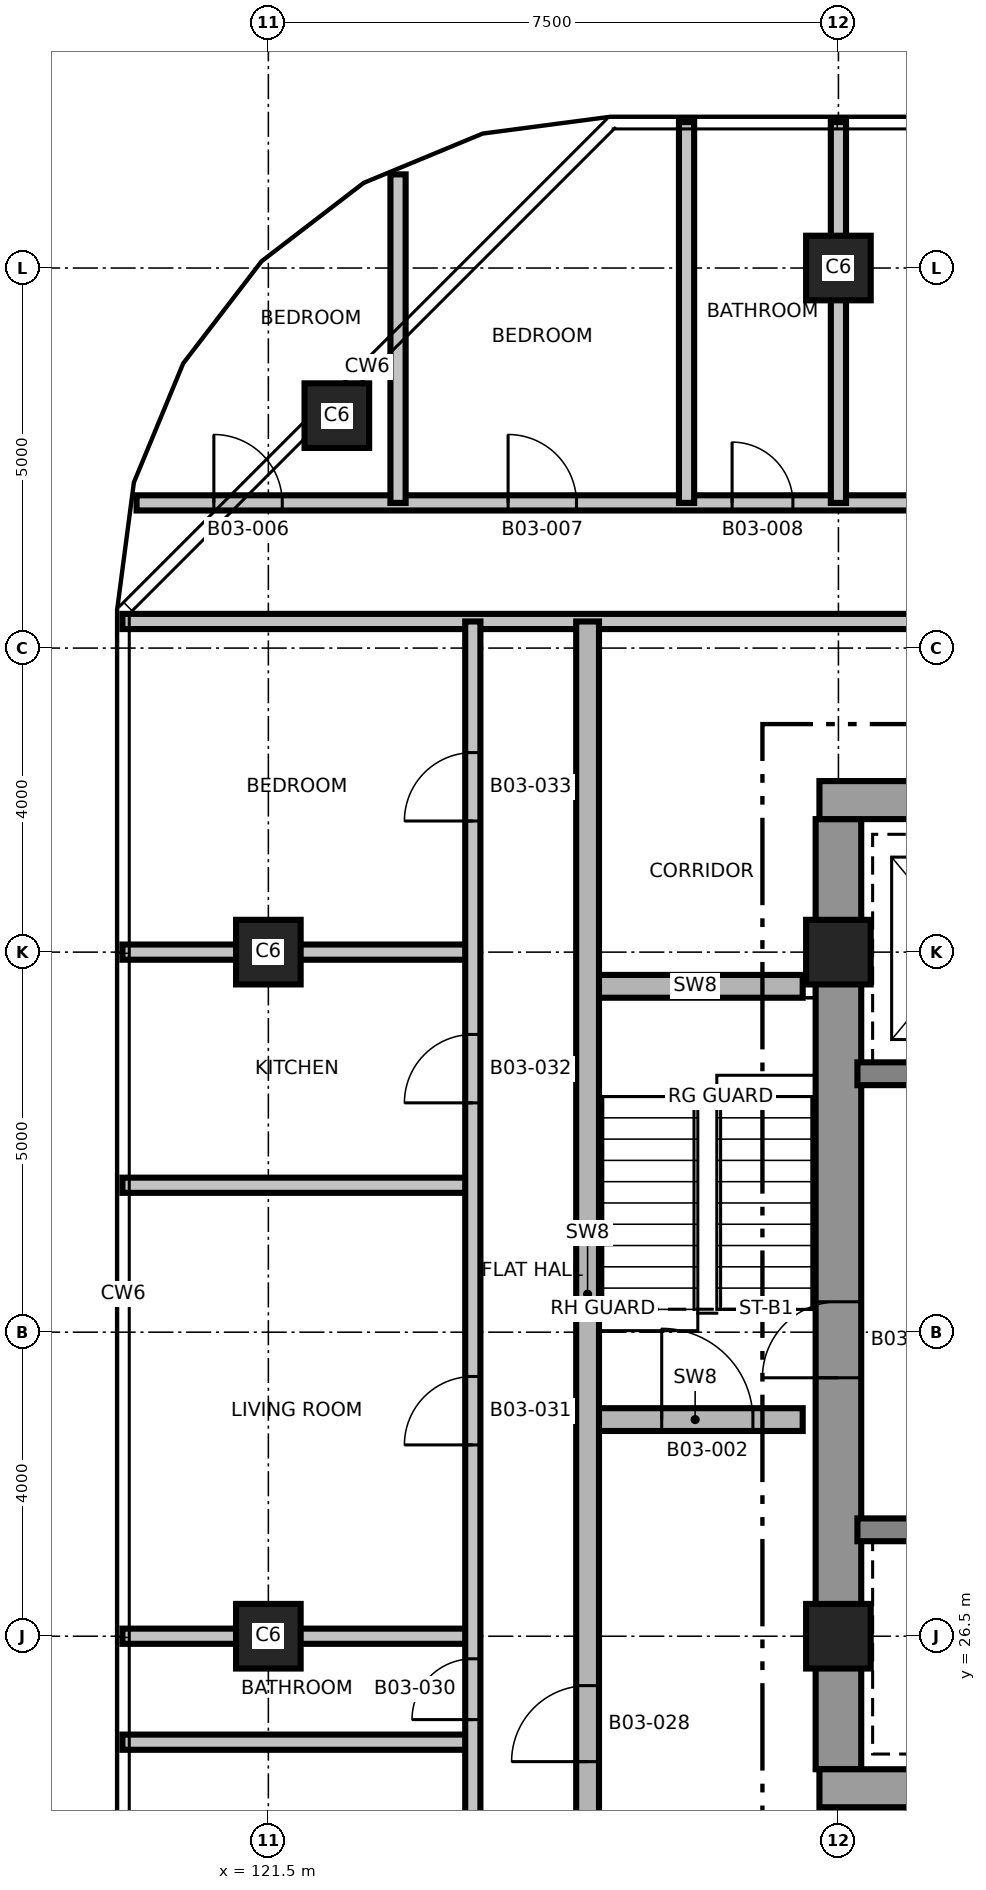
"""IFC4 building model, lengths in metres.
Left out: names, types, materials, properties, quantities, classifications, styles, units other than length and angle.
Written with IfcOpenShell. Run it as: python <this file> out.ifc"""

import sys

from ifc_helpers import new_model, si_unit, direction, frame, frame_2d, origin, origin_2d, place, context, subcontext, project, spatial, rectangle, extrude, element, fill, save


model = new_model("IFC4")
c1 = context("Model", 3, precision=1e-05, world=origin(), true_north=direction((0.0, 1.0)))
c2 = subcontext(c1, "Body", "Model", "MODEL_VIEW")
j1 = project(units=[si_unit("LENGTHUNIT", "METRE"), si_unit("PLANEANGLEUNIT", "RADIAN")], contexts=[c1])
p1 = place(None, origin())
s1 = spatial("IfcSite", under=j1, at=p1, CompositionType="ELEMENT")
p2 = place(p1, origin())
s2 = spatial("IfcBuilding", under=s1, at=p2, CompositionType="ELEMENT")
p3 = place(p2, frame((0.0, 0.0, 59.4)))
s3 = spatial("IfcBuildingStorey", under=s2, at=p3, CompositionType="ELEMENT", Elevation=59.4)
p4 = place(p3, frame((129.0, 24.75, 0.0), z_axis=(0.0, 0.0, 1.0), x_axis=(0.0, 1.0, 0.0)))
e1 = element("IfcWall", 1, at=p4, inside=s3, PredefinedType="SHEAR", context=c2, shape_type="SweptSolid", body=[
    extrude(rectangle(XDim=12.5, YDim=0.6, at=frame_2d((6.25, 0.0))), origin(), (0.0, 0.0, 1.0), 3.7),
])
p5 = place(p4, frame((5.15, 0.0, 0.0)))
e2 = element("IfcOpeningElement", 2, at=p5, cuts=e1, PredefinedType="OPENING", context=c2, shape_type="SweptSolid", body=[
    extrude(rectangle(XDim=1.0, YDim=2.1, at=frame_2d((0.5, 1.05))), frame((0.0, 0.31, 0.0), z_axis=(0.0, -1.0, 0.0), x_axis=(1.0, 0.0, 0.0)), (0.0, 0.0, 1.0), 0.62),
])
p6 = place(p3, frame((128.75, 24.5, 0.0), z_axis=(0.0, 0.0, 1.0), x_axis=(1.0, 0.0, 0.0)))
e3 = element("IfcWall", 3, at=p6, inside=s3, PredefinedType="SHEAR", context=c2, shape_type="SweptSolid", body=[
    extrude(rectangle(XDim=15.0, YDim=0.5, at=frame_2d((7.5, 0.0))), origin(), (0.0, 0.0, 1.0), 3.7),
])
p7 = place(p6, frame((9.65, 0.0, 0.0)))
e4 = element("IfcOpeningElement", 4, at=p7, cuts=e3, PredefinedType="OPENING", context=c2, shape_type="SweptSolid", body=[
    extrude(rectangle(XDim=1.5, YDim=2.1, at=frame_2d((0.75, 1.05))), frame((0.0, 0.26, 0.0), z_axis=(0.0, -1.0, 0.0), x_axis=(1.0, 0.0, 0.0)), (0.0, 0.0, 1.0), 0.52),
])
p8 = place(p6, frame((1.25, 0.0, 0.0)))
e5 = element("IfcOpeningElement", 5, at=p8, cuts=e3, PredefinedType="OPENING", context=c2, shape_type="SweptSolid", body=[
    extrude(rectangle(XDim=0.9, YDim=2.1, at=frame_2d((0.45, 1.05))), frame((0.0, 0.26, 0.0), z_axis=(0.0, -1.0, 0.0), x_axis=(1.0, 0.0, 0.0)), (0.0, 0.0, 1.0), 0.52),
])
p9 = place(p3, frame((128.75, 37.5, 0.0), z_axis=(0.0, 0.0, 1.0), x_axis=(1.0, 0.0, 0.0)))
e6 = element("IfcWall", 6, at=p9, inside=s3, PredefinedType="SHEAR", context=c2, shape_type="SweptSolid", body=[
    extrude(rectangle(XDim=15.0, YDim=0.5, at=frame_2d((7.5, 0.0))), origin(), (0.0, 0.0, 1.0), 3.7),
])
p10 = place(p9, frame((9.65, 0.0, 0.0)))
e7 = element("IfcOpeningElement", 7, at=p10, cuts=e6, PredefinedType="OPENING", context=c2, shape_type="SweptSolid", body=[
    extrude(rectangle(XDim=1.5, YDim=2.1, at=frame_2d((0.75, 1.05))), frame((0.0, 0.26, 0.0), z_axis=(0.0, -1.0, 0.0), x_axis=(1.0, 0.0, 0.0)), (0.0, 0.0, 1.0), 0.52),
])
p11 = place(p9, frame((12.85, 0.0, 0.0)))
e8 = element("IfcOpeningElement", 8, at=p11, cuts=e6, PredefinedType="OPENING", context=c2, shape_type="SweptSolid", body=[
    extrude(rectangle(XDim=0.9, YDim=2.1, at=frame_2d((0.45, 1.05))), frame((0.0, 0.26, 0.0), z_axis=(0.0, -1.0, 0.0), x_axis=(1.0, 0.0, 0.0)), (0.0, 0.0, 1.0), 0.52),
])
p12 = place(p9, frame((3.8, 0.0, 0.0)))
e9 = element("IfcOpeningElement", 9, at=p12, cuts=e6, PredefinedType="OPENING", context=c2, shape_type="SweptSolid", body=[
    extrude(rectangle(XDim=0.9, YDim=2.1, at=frame_2d((0.45, 1.05))), frame((0.0, 0.26, 0.0), z_axis=(0.0, -1.0, 0.0), x_axis=(1.0, 0.0, 0.0)), (0.0, 0.0, 1.0), 0.52),
])
p13 = place(p9, frame((6.7, 0.0, 0.0)))
e10 = element("IfcOpeningElement", 10, at=p13, cuts=e6, PredefinedType="OPENING", context=c2, shape_type="SweptSolid", body=[
    extrude(rectangle(XDim=0.9, YDim=2.1, at=frame_2d((0.45, 1.05))), frame((0.0, 0.26, 0.0), z_axis=(0.0, -1.0, 0.0), x_axis=(1.0, 0.0, 0.0)), (0.0, 0.0, 1.0), 0.52),
])
p14 = place(p3, frame((129.25, 27.9, 0.0), z_axis=(0.0, 0.0, 1.0), x_axis=(1.0, 0.0, 0.0)))
e11 = element("IfcWall", 11, at=p14, inside=s3, PredefinedType="SHEAR", context=c2, shape_type="SweptSolid", body=[
    extrude(rectangle(XDim=2.7, YDim=0.3, at=frame_2d((1.35, 0.0))), origin(), (0.0, 0.0, 1.0), 3.7),
])
p15 = place(p3, frame((129.25, 33.9, 0.0), z_axis=(0.0, 0.0, 1.0), x_axis=(1.0, 0.0, 0.0)))
e12 = element("IfcWall", 12, at=p15, inside=s3, PredefinedType="SHEAR", context=c2, shape_type="SweptSolid", body=[
    extrude(rectangle(XDim=2.7, YDim=0.3, at=frame_2d((1.35, 0.0))), origin(), (0.0, 0.0, 1.0), 3.7),
])
p16 = place(p15, frame((1.05, 0.0, 0.0)))
e13 = element("IfcOpeningElement", 13, at=p16, cuts=e12, PredefinedType="OPENING", context=c2, shape_type="SweptSolid", body=[
    extrude(rectangle(XDim=1.3, YDim=2.4, at=frame_2d((0.65, 1.2))), frame((0.0, 0.16, 0.0), z_axis=(0.0, -1.0, 0.0), x_axis=(1.0, 0.0, 0.0)), (0.0, 0.0, 1.0), 0.32),
])
for number, where, z_axis, x_axis in (
    (14, (121.5, 26.5, 0.0), (0.0, 0.0, 1.0), (1.0, 0.0, 0.0)),
    (15, (129.0, 26.5, 0.0), (0.0, 0.0, 1.0), (1.0, 0.0, 0.0)),
    (16, (121.5, 35.5, 0.0), (0.0, 0.0, 1.0), (1.0, 0.0, 0.0)),
    (17, (129.0, 35.5, 0.0), (0.0, 0.0, 1.0), (1.0, 0.0, 0.0)),
    (18, (122.401, 42.558, 0.0), (0.0, 0.0, 1.0), (1.0, 0.0, 0.0)),
    (19, (129.0, 44.5, 0.0), (0.0, 0.0, 1.0), (1.0, 0.0, 0.0)),
):
    element("IfcColumn", number, at=place(p3, frame(where, z_axis=z_axis, x_axis=x_axis)), inside=s3, PredefinedType="COLUMN", context=c2, shape_type="SweptSolid", body=[
        extrude(rectangle(XDim=0.85, YDim=0.85, at=origin_2d()), origin(), (0.0, 0.0, 1.0), 3.7),
    ])
for number, where, z_axis, x_axis in (
    (20, (119.58, 25.106, 0.0), (0.0, 0.0, 1.0), (1.0, 0.0, 0.0)),
    (21, (119.58, 26.5, 0.0), (0.0, 0.0, 1.0), (1.0, 0.0, 0.0)),
):
    element("IfcWall", number, at=place(p3, frame(where, z_axis=z_axis, x_axis=x_axis)), inside=s3, PredefinedType="PARTITIONING", context=c2, shape_type="SweptSolid", body=[
        extrude(rectangle(XDim=4.61, YDim=0.2, at=frame_2d((2.305, 0.0))), origin(), (0.0, 0.0, 1.0), 3.4),
    ])
p17 = place(p3, frame((125.7, 29.35, 0.0), z_axis=(0.0, 0.0, 1.0), x_axis=(1.0, 0.0, 0.0)))
e22 = element("IfcWall", 22, at=p17, inside=s3, PredefinedType="SHEAR", context=c2, shape_type="SweptSolid", body=[
    extrude(rectangle(XDim=2.83, YDim=0.3, at=frame_2d((1.415, 0.0))), origin(), (0.0, 0.0, 1.0), 3.4),
])
p18 = place(p17, frame((0.975, 0.0, 0.0)))
e23 = element("IfcOpeningElement", 23, at=p18, cuts=e22, PredefinedType="OPENING", context=c2, shape_type="SweptSolid", body=[
    extrude(rectangle(XDim=1.2, YDim=2.1, at=frame_2d((0.6, 1.05))), frame((0.0, 0.16, 0.0), z_axis=(0.0, -1.0, 0.0), x_axis=(1.0, 0.0, 0.0)), (0.0, 0.0, 1.0), 0.32),
])
p19 = place(p3, frame((119.58, 32.433, 0.0), z_axis=(0.0, 0.0, 1.0), x_axis=(1.0, 0.0, 0.0)))
e24 = element("IfcWall", 24, at=p19, inside=s3, PredefinedType="PARTITIONING", context=c2, shape_type="SweptSolid", body=[
    extrude(rectangle(XDim=4.61, YDim=0.2, at=frame_2d((2.305, 0.0))), origin(), (0.0, 0.0, 1.0), 3.4),
])
p20 = place(p3, frame((125.7, 35.05, 0.0), z_axis=(0.0, 0.0, 1.0), x_axis=(1.0, 0.0, 0.0)))
e25 = element("IfcWall", 25, at=p20, inside=s3, PredefinedType="SHEAR", context=c2, shape_type="SweptSolid", body=[
    extrude(rectangle(XDim=2.83, YDim=0.3, at=frame_2d((1.415, 0.0))), origin(), (0.0, 0.0, 1.0), 3.4),
])
p21 = place(p3, frame((119.58, 35.5, 0.0), z_axis=(0.0, 0.0, 1.0), x_axis=(1.0, 0.0, 0.0)))
e26 = element("IfcWall", 26, at=p21, inside=s3, PredefinedType="PARTITIONING", context=c2, shape_type="SweptSolid", body=[
    extrude(rectangle(XDim=4.61, YDim=0.2, at=frame_2d((2.305, 0.0))), origin(), (0.0, 0.0, 1.0), 3.4),
])
p22 = place(p3, frame((119.58, 39.85, 0.0), z_axis=(0.0, 0.0, 1.0), x_axis=(1.0, 0.0, 0.0)))
e27 = element("IfcWall", 27, at=p22, inside=s3, PredefinedType="PARTITIONING", context=c2, shape_type="SweptSolid", body=[
    extrude(rectangle(XDim=33.84, YDim=0.2, at=frame_2d((16.92, 0.0))), origin(), (0.0, 0.0, 1.0), 3.4),
])
p23 = place(p22, frame((15.27, 0.0, 0.0)))
e28 = element("IfcOpeningElement", 28, at=p23, cuts=e27, PredefinedType="OPENING", context=c2, shape_type="SweptSolid", body=[
    extrude(rectangle(XDim=1.0, YDim=2.1, at=frame_2d((0.5, 1.05))), frame((0.0, 0.11, 0.0), z_axis=(0.0, -1.0, 0.0), x_axis=(1.0, 0.0, 0.0)), (0.0, 0.0, 1.0), 0.22),
])
p24 = place(p22, frame((25.07, 0.0, 0.0)))
e29 = element("IfcOpeningElement", 29, at=p24, cuts=e27, PredefinedType="OPENING", context=c2, shape_type="SweptSolid", body=[
    extrude(rectangle(XDim=1.0, YDim=2.1, at=frame_2d((0.5, 1.05))), frame((0.0, 0.11, 0.0), z_axis=(0.0, -1.0, 0.0), x_axis=(1.0, 0.0, 0.0)), (0.0, 0.0, 1.0), 0.22),
])
p25 = place(p3, frame((119.766, 41.41, 0.0), z_axis=(0.0, 0.0, 1.0), x_axis=(1.0, 0.0, 0.0)))
e30 = element("IfcWall", 30, at=p25, inside=s3, PredefinedType="PARTITIONING", context=c2, shape_type="SweptSolid", body=[
    extrude(rectangle(XDim=33.468, YDim=0.2, at=frame_2d((16.734, 0.0))), origin(), (0.0, 0.0, 1.0), 3.4),
])
p26 = place(p25, frame((1.017, 0.0, 0.0)))
e31 = element("IfcOpeningElement", 31, at=p26, cuts=e30, PredefinedType="OPENING", context=c2, shape_type="SweptSolid", body=[
    extrude(rectangle(XDim=0.9, YDim=2.1, at=frame_2d((0.45, 1.05))), frame((0.0, 0.11, 0.0), z_axis=(0.0, -1.0, 0.0), x_axis=(1.0, 0.0, 0.0)), (0.0, 0.0, 1.0), 0.22),
])
p27 = place(p25, frame((4.888, 0.0, 0.0)))
e32 = element("IfcOpeningElement", 32, at=p27, cuts=e30, PredefinedType="OPENING", context=c2, shape_type="SweptSolid", body=[
    extrude(rectangle(XDim=0.9, YDim=2.1, at=frame_2d((0.45, 1.05))), frame((0.0, 0.11, 0.0), z_axis=(0.0, -1.0, 0.0), x_axis=(1.0, 0.0, 0.0)), (0.0, 0.0, 1.0), 0.22),
])
p28 = place(p25, frame((7.835, 0.0, 0.0)))
e33 = element("IfcOpeningElement", 33, at=p28, cuts=e30, PredefinedType="OPENING", context=c2, shape_type="SweptSolid", body=[
    extrude(rectangle(XDim=0.8, YDim=2.1, at=frame_2d((0.4, 1.05))), frame((0.0, 0.11, 0.0), z_axis=(0.0, -1.0, 0.0), x_axis=(1.0, 0.0, 0.0)), (0.0, 0.0, 1.0), 0.22),
])
p29 = place(p25, frame((11.251, 0.0, 0.0)))
e34 = element("IfcOpeningElement", 34, at=p29, cuts=e30, PredefinedType="OPENING", context=c2, shape_type="SweptSolid", body=[
    extrude(rectangle(XDim=0.9, YDim=2.1, at=frame_2d((0.45, 1.05))), frame((0.0, 0.11, 0.0), z_axis=(0.0, -1.0, 0.0), x_axis=(1.0, 0.0, 0.0)), (0.0, 0.0, 1.0), 0.22),
])
p30 = place(p25, frame((15.001, 0.0, 0.0)))
e35 = element("IfcOpeningElement", 35, at=p30, cuts=e30, PredefinedType="OPENING", context=c2, shape_type="SweptSolid", body=[
    extrude(rectangle(XDim=0.9, YDim=2.1, at=frame_2d((0.45, 1.05))), frame((0.0, 0.11, 0.0), z_axis=(0.0, -1.0, 0.0), x_axis=(1.0, 0.0, 0.0)), (0.0, 0.0, 1.0), 0.22),
])
p31 = place(p25, frame((18.783, 0.0, 0.0)))
e36 = element("IfcOpeningElement", 36, at=p31, cuts=e30, PredefinedType="OPENING", context=c2, shape_type="SweptSolid", body=[
    extrude(rectangle(XDim=0.9, YDim=2.1, at=frame_2d((0.45, 1.05))), frame((0.0, 0.11, 0.0), z_axis=(0.0, -1.0, 0.0), x_axis=(1.0, 0.0, 0.0)), (0.0, 0.0, 1.0), 0.22),
])
p32 = place(p25, frame((22.583, 0.0, 0.0)))
e37 = element("IfcOpeningElement", 37, at=p32, cuts=e30, PredefinedType="OPENING", context=c2, shape_type="SweptSolid", body=[
    extrude(rectangle(XDim=0.8, YDim=2.1, at=frame_2d((0.4, 1.05))), frame((0.0, 0.11, 0.0), z_axis=(0.0, -1.0, 0.0), x_axis=(1.0, 0.0, 0.0)), (0.0, 0.0, 1.0), 0.22),
])
p33 = place(p25, frame((24.821, 0.0, 0.0)))
e38 = element("IfcOpeningElement", 38, at=p33, cuts=e30, PredefinedType="OPENING", context=c2, shape_type="SweptSolid", body=[
    extrude(rectangle(XDim=0.8, YDim=2.1, at=frame_2d((0.4, 1.05))), frame((0.0, 0.11, 0.0), z_axis=(0.0, -1.0, 0.0), x_axis=(1.0, 0.0, 0.0)), (0.0, 0.0, 1.0), 0.22),
])
p34 = place(p25, frame((26.923, 0.0, 0.0)))
e39 = element("IfcOpeningElement", 39, at=p34, cuts=e30, PredefinedType="OPENING", context=c2, shape_type="SweptSolid", body=[
    extrude(rectangle(XDim=0.9, YDim=2.1, at=frame_2d((0.45, 1.05))), frame((0.0, 0.11, 0.0), z_axis=(0.0, -1.0, 0.0), x_axis=(1.0, 0.0, 0.0)), (0.0, 0.0, 1.0), 0.22),
])
p35 = place(p25, frame((31.556, 0.0, 0.0)))
e40 = element("IfcOpeningElement", 40, at=p35, cuts=e30, PredefinedType="OPENING", context=c2, shape_type="SweptSolid", body=[
    extrude(rectangle(XDim=0.9, YDim=2.1, at=frame_2d((0.45, 1.05))), frame((0.0, 0.11, 0.0), z_axis=(0.0, -1.0, 0.0), x_axis=(1.0, 0.0, 0.0)), (0.0, 0.0, 1.0), 0.22),
])
p36 = place(p3, frame((123.206, 41.41, 0.0), z_axis=(0.0, 0.0, 1.0), x_axis=(0.0, 1.0, 0.0)))
e41 = element("IfcWall", 41, at=p36, inside=s3, PredefinedType="PARTITIONING", context=c2, shape_type="SweptSolid", body=[
    extrude(rectangle(XDim=4.322, YDim=0.2, at=frame_2d((2.161, 0.0))), origin(), (0.0, 0.0, 1.0), 3.4),
])
p37 = place(p3, frame((124.19, 22.15, 0.0), z_axis=(0.0, 0.0, 1.0), x_axis=(0.0, 1.0, 0.0)))
e42 = element("IfcWall", 42, at=p37, inside=s3, PredefinedType="PARTITIONING", context=c2, shape_type="SweptSolid", body=[
    extrude(rectangle(XDim=17.7, YDim=0.2, at=frame_2d((8.85, 0.0))), origin(), (0.0, 0.0, 1.0), 3.4),
])
p38 = place(p37, frame((1.028, 0.0, 0.0)))
e43 = element("IfcOpeningElement", 43, at=p38, cuts=e42, PredefinedType="OPENING", context=c2, shape_type="SweptSolid", body=[
    extrude(rectangle(XDim=0.9, YDim=2.1, at=frame_2d((0.45, 1.05))), frame((0.0, 0.11, 0.0), z_axis=(0.0, -1.0, 0.0), x_axis=(1.0, 0.0, 0.0)), (0.0, 0.0, 1.0), 0.22),
])
p39 = place(p37, frame((3.253, 0.0, 0.0)))
e44 = element("IfcOpeningElement", 44, at=p39, cuts=e42, PredefinedType="OPENING", context=c2, shape_type="SweptSolid", body=[
    extrude(rectangle(XDim=0.8, YDim=2.1, at=frame_2d((0.4, 1.05))), frame((0.0, 0.11, 0.0), z_axis=(0.0, -1.0, 0.0), x_axis=(1.0, 0.0, 0.0)), (0.0, 0.0, 1.0), 0.22),
])
p40 = place(p37, frame((6.867, 0.0, 0.0)))
e45 = element("IfcOpeningElement", 45, at=p40, cuts=e42, PredefinedType="OPENING", context=c2, shape_type="SweptSolid", body=[
    extrude(rectangle(XDim=0.9, YDim=2.1, at=frame_2d((0.45, 1.05))), frame((0.0, 0.11, 0.0), z_axis=(0.0, -1.0, 0.0), x_axis=(1.0, 0.0, 0.0)), (0.0, 0.0, 1.0), 0.22),
])
p41 = place(p37, frame((11.367, 0.0, 0.0)))
e46 = element("IfcOpeningElement", 46, at=p41, cuts=e42, PredefinedType="OPENING", context=c2, shape_type="SweptSolid", body=[
    extrude(rectangle(XDim=0.9, YDim=2.1, at=frame_2d((0.45, 1.05))), frame((0.0, 0.11, 0.0), z_axis=(0.0, -1.0, 0.0), x_axis=(1.0, 0.0, 0.0)), (0.0, 0.0, 1.0), 0.22),
])
p42 = place(p37, frame((15.075, 0.0, 0.0)))
e47 = element("IfcOpeningElement", 47, at=p42, cuts=e42, PredefinedType="OPENING", context=c2, shape_type="SweptSolid", body=[
    extrude(rectangle(XDim=0.9, YDim=2.1, at=frame_2d((0.45, 1.05))), frame((0.0, 0.11, 0.0), z_axis=(0.0, -1.0, 0.0), x_axis=(1.0, 0.0, 0.0)), (0.0, 0.0, 1.0), 0.22),
])
p43 = place(p3, frame((125.7, 22.15, 0.0), z_axis=(0.0, 0.0, 1.0), x_axis=(0.0, 1.0, 0.0)))
e48 = element("IfcWall", 48, at=p43, inside=s3, PredefinedType="SHEAR", context=c2, shape_type="SweptSolid", body=[
    extrude(rectangle(XDim=17.7, YDim=0.3, at=frame_2d((8.85, 0.0))), origin(), (0.0, 0.0, 1.0), 3.4),
])
p44 = place(p43, frame((2.7, 0.0, 0.0)))
e49 = element("IfcOpeningElement", 49, at=p44, cuts=e48, PredefinedType="OPENING", context=c2, shape_type="SweptSolid", body=[
    extrude(rectangle(XDim=1.0, YDim=2.1, at=frame_2d((0.5, 1.05))), frame((0.0, 0.16, 0.0), z_axis=(0.0, -1.0, 0.0), x_axis=(1.0, 0.0, 0.0)), (0.0, 0.0, 1.0), 0.32),
])
for number, where, z_axis, x_axis in (
    (50, (127.002, 41.41, 0.0), (0.0, 0.0, 1.0), (0.0, 1.0, 0.0)),
    (51, (129.0, 41.41, 0.0), (0.0, 0.0, 1.0), (0.0, 1.0, 0.0)),
):
    element("IfcWall", number, at=place(p3, frame(where, z_axis=z_axis, x_axis=x_axis)), inside=s3, PredefinedType="PARTITIONING", context=c2, shape_type="SweptSolid", body=[
        extrude(rectangle(XDim=5.01, YDim=0.2, at=frame_2d((2.505, 0.0))), origin(), (0.0, 0.0, 1.0), 3.4),
    ])
p45 = place(p18, origin())
e52 = element("IfcDoor", 52, at=p45, inside=s3, OperationType="SINGLE_SWING_RIGHT", PredefinedType="DOOR", context=c2, shape_type="SweptSolid", body=[
    extrude(rectangle(XDim=1.2, YDim=2.1, at=frame_2d((0.6, 1.05))), frame((0.0, 0.025, 0.0), z_axis=(0.0, -1.0, 0.0), x_axis=(1.0, 0.0, 0.0)), (0.0, 0.0, 1.0), 0.05),
])
fill(e23, e52)
p46 = place(p26, origin())
e53 = element("IfcDoor", 53, at=p46, inside=s3, OperationType="SINGLE_SWING_RIGHT", PredefinedType="DOOR", context=c2, shape_type="SweptSolid", body=[
    extrude(rectangle(XDim=0.9, YDim=2.1, at=frame_2d((0.45, 1.05))), frame((0.0, 0.025, 0.0), z_axis=(0.0, -1.0, 0.0), x_axis=(1.0, 0.0, 0.0)), (0.0, 0.0, 1.0), 0.05),
])
fill(e31, e53)
p47 = place(p27, origin())
e54 = element("IfcDoor", 54, at=p47, inside=s3, OperationType="SINGLE_SWING_LEFT", PredefinedType="DOOR", context=c2, shape_type="SweptSolid", body=[
    extrude(rectangle(XDim=0.9, YDim=2.1, at=frame_2d((0.45, 1.05))), frame((0.0, 0.025, 0.0), z_axis=(0.0, -1.0, 0.0), x_axis=(1.0, 0.0, 0.0)), (0.0, 0.0, 1.0), 0.05),
])
fill(e32, e54)
p48 = place(p28, origin())
e55 = element("IfcDoor", 55, at=p48, inside=s3, OperationType="SINGLE_SWING_RIGHT", PredefinedType="DOOR", context=c2, shape_type="SweptSolid", body=[
    extrude(rectangle(XDim=0.8, YDim=2.1, at=frame_2d((0.4, 1.05))), frame((0.0, 0.025, 0.0), z_axis=(0.0, -1.0, 0.0), x_axis=(1.0, 0.0, 0.0)), (0.0, 0.0, 1.0), 0.05),
])
fill(e33, e55)
p49 = place(p44, origin())
e56 = element("IfcDoor", 56, at=p49, inside=s3, OperationType="SINGLE_SWING_RIGHT", PredefinedType="DOOR", context=c2, shape_type="SweptSolid", body=[
    extrude(rectangle(XDim=1.0, YDim=2.1, at=frame_2d((0.5, 1.05))), frame((0.0, 0.025, 0.0), z_axis=(0.0, -1.0, 0.0), x_axis=(1.0, 0.0, 0.0)), (0.0, 0.0, 1.0), 0.05),
])
fill(e49, e56)
p50 = place(p39, origin())
e57 = element("IfcDoor", 57, at=p50, inside=s3, OperationType="SINGLE_SWING_RIGHT", PredefinedType="DOOR", context=c2, shape_type="SweptSolid", body=[
    extrude(rectangle(XDim=0.8, YDim=2.1, at=frame_2d((0.4, 1.05))), frame((0.0, 0.025, 0.0), z_axis=(0.0, -1.0, 0.0), x_axis=(1.0, 0.0, 0.0)), (0.0, 0.0, 1.0), 0.05),
])
fill(e44, e57)
p51 = place(p40, origin())
e58 = element("IfcDoor", 58, at=p51, inside=s3, OperationType="SINGLE_SWING_LEFT", PredefinedType="DOOR", context=c2, shape_type="SweptSolid", body=[
    extrude(rectangle(XDim=0.9, YDim=2.1, at=frame_2d((0.45, 1.05))), frame((0.0, 0.025, 0.0), z_axis=(0.0, -1.0, 0.0), x_axis=(1.0, 0.0, 0.0)), (0.0, 0.0, 1.0), 0.05),
])
fill(e45, e58)
p52 = place(p41, origin())
e59 = element("IfcDoor", 59, at=p52, inside=s3, OperationType="SINGLE_SWING_RIGHT", PredefinedType="DOOR", context=c2, shape_type="SweptSolid", body=[
    extrude(rectangle(XDim=0.9, YDim=2.1, at=frame_2d((0.45, 1.05))), frame((0.0, 0.025, 0.0), z_axis=(0.0, -1.0, 0.0), x_axis=(1.0, 0.0, 0.0)), (0.0, 0.0, 1.0), 0.05),
])
fill(e46, e59)
p53 = place(p42, origin())
e60 = element("IfcDoor", 60, at=p53, inside=s3, OperationType="SINGLE_SWING_LEFT", PredefinedType="DOOR", context=c2, shape_type="SweptSolid", body=[
    extrude(rectangle(XDim=0.9, YDim=2.1, at=frame_2d((0.45, 1.05))), frame((0.0, 0.025, 0.0), z_axis=(0.0, -1.0, 0.0), x_axis=(1.0, 0.0, 0.0)), (0.0, 0.0, 1.0), 0.05),
])
fill(e47, e60)
p54 = place(p5, origin())
e61 = element("IfcDoor", 61, at=p54, inside=s3, OperationType="SINGLE_SWING_RIGHT", PredefinedType="DOOR", context=c2, shape_type="SweptSolid", body=[
    extrude(rectangle(XDim=1.0, YDim=2.1, at=frame_2d((0.5, 1.05))), frame((0.0, 0.025, 0.0), z_axis=(0.0, -1.0, 0.0), x_axis=(1.0, 0.0, 0.0)), (0.0, 0.0, 1.0), 0.05),
])
fill(e2, e61)
save(model, sys.argv[1])
